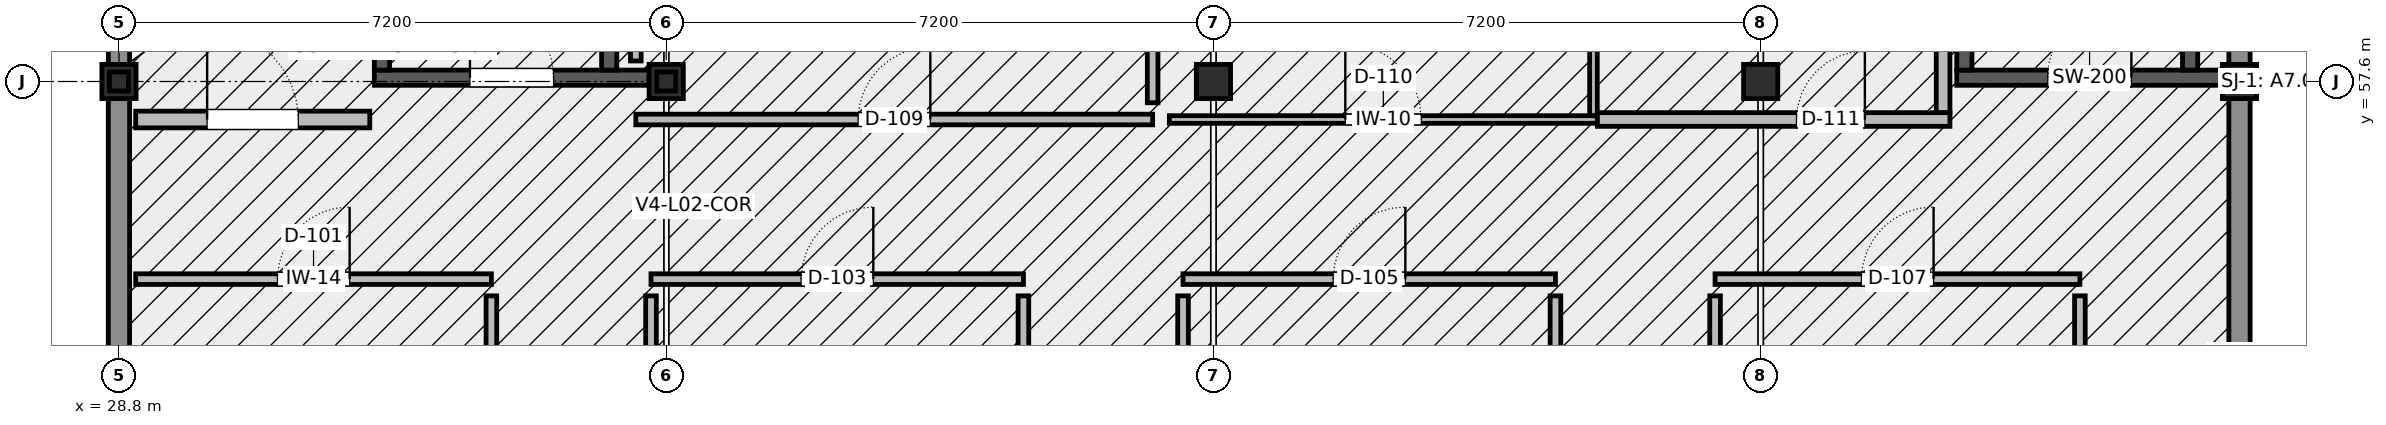
"""IFC4 building model, lengths in metres.
Left out: names, types, materials, properties, quantities, classifications, styles, units other than length and angle.
Written with IfcOpenShell. Run it as: python <this file> out.ifc"""

import sys

from ifc_helpers import new_model, si_unit, direction, frame, frame_2d, origin, origin_2d, place, context, subcontext, project, spatial, rectangle, hollow_rectangle, extrude, element, fill, save


model = new_model("IFC4")
c1 = context("Model", 3, precision=1e-05, world=origin(), true_north=direction((0.0, 1.0)))
c2 = subcontext(c1, "Body", "Model", "MODEL_VIEW")
j1 = project(units=[si_unit("LENGTHUNIT", "METRE"), si_unit("PLANEANGLEUNIT", "RADIAN")], contexts=[c1])
p1 = place(None, origin())
s1 = spatial("IfcSite", under=j1, at=p1, CompositionType="ELEMENT")
p2 = place(p1, origin())
s2 = spatial("IfcBuilding", under=s1, at=p2, CompositionType="ELEMENT")
p3 = place(p2, frame((0.0, 0.0, 9.6)))
s3 = spatial("IfcBuildingStorey", under=s2, at=p3, CompositionType="ELEMENT", Elevation=9.6)
for number, where, z_axis, x_axis in (
    (1, (28.8, 57.6, 0.0), (0.0, 0.0, 1.0), (1.0, 0.0, 0.0)),
    (2, (36.0, 57.6, 0.0), (0.0, 0.0, 1.0), (1.0, 0.0, 0.0)),
    (3, (43.2, 57.6, 0.0), (0.0, 0.0, 1.0), (1.0, 0.0, 0.0)),
    (4, (50.4, 57.6, 0.0), (0.0, 0.0, 1.0), (1.0, 0.0, 0.0)),
    (5, (56.7, 57.6, 0.0), (0.0, 0.0, 1.0), (1.0, 0.0, 0.0)),
):
    element("IfcColumn", number, at=place(p3, frame(where, z_axis=z_axis, x_axis=x_axis)), inside=s3, PredefinedType="COLUMN", context=c2, shape_type="SweptSolid", body=[
        extrude(rectangle(XDim=0.45, YDim=0.45, at=origin_2d()), origin(), (0.0, 0.0, 1.0), 3.9),
    ])
p4 = place(p3, frame((32.16, 57.65, 0.0), z_axis=(0.0, 0.0, 1.0), x_axis=(1.0, 0.0, 0.0)))
e6 = element("IfcWall", 6, at=p4, inside=s3, PredefinedType="SHEAR", context=c2, shape_type="SweptSolid", body=[
    extrude(rectangle(XDim=3.615, YDim=0.2, at=frame_2d((1.808, 0.0))), origin(), (0.0, 0.0, 1.0), 3.65),
])
p5 = place(p4, frame((1.258, 0.0, 0.0)))
e7 = element("IfcOpeningElement", 7, at=p5, cuts=e6, PredefinedType="OPENING", context=c2, shape_type="SweptSolid", body=[
    extrude(rectangle(XDim=1.1, YDim=2.15, at=frame_2d((0.55, 1.075))), frame((0.0, 0.112, 0.0), z_axis=(0.0, -1.0, 0.0), x_axis=(1.0, 0.0, 0.0)), (0.0, 0.0, 1.0), 0.224),
])
for number, where, z_axis, x_axis in (
    (8, (32.26, 57.75, 0.0), (0.0, 0.0, 1.0), (0.0, 1.0, 0.0)),
    (9, (35.25, 57.75, 0.0), (0.0, 0.0, 1.0), (0.0, 1.0, 0.0)),
):
    element("IfcWall", number, at=place(p3, frame(where, z_axis=z_axis, x_axis=x_axis)), inside=s3, PredefinedType="SHEAR", context=c2, shape_type="SweptSolid", body=[
        extrude(rectangle(XDim=6.56, YDim=0.2, at=frame_2d((3.28, 0.0))), origin(), (0.0, 0.0, 1.0), 3.65),
    ])
p6 = place(p3, frame((52.98, 57.65, 0.0), z_axis=(0.0, 0.0, 1.0), x_axis=(1.0, 0.0, 0.0)))
e10 = element("IfcWall", 10, at=p6, inside=s3, PredefinedType="SHEAR", context=c2, shape_type="SweptSolid", body=[
    extrude(rectangle(XDim=3.495, YDim=0.2, at=frame_2d((1.748, 0.0))), origin(), (0.0, 0.0, 1.0), 3.65),
])
p7 = place(p6, frame((1.198, 0.0, 0.0)))
e11 = element("IfcOpeningElement", 11, at=p7, cuts=e10, PredefinedType="OPENING", context=c2, shape_type="SweptSolid", body=[
    extrude(rectangle(XDim=1.1, YDim=2.15, at=frame_2d((0.55, 1.075))), frame((0.0, 0.112, 0.0), z_axis=(0.0, -1.0, 0.0), x_axis=(1.0, 0.0, 0.0)), (0.0, 0.0, 1.0), 0.224),
])
for number, where, z_axis, x_axis in (
    (12, (53.08, 57.75, 0.0), (0.0, 0.0, 1.0), (0.0, 1.0, 0.0)),
    (13, (56.05, 57.75, 0.0), (0.0, 0.0, 1.0), (0.0, 1.0, 0.0)),
):
    element("IfcWall", number, at=place(p3, frame(where, z_axis=z_axis, x_axis=x_axis)), inside=s3, PredefinedType="SHEAR", context=c2, shape_type="SweptSolid", body=[
        extrude(rectangle(XDim=6.54, YDim=0.2, at=frame_2d((3.27, 0.0))), origin(), (0.0, 0.0, 1.0), 3.65),
    ])
p8 = place(p3, frame((28.8, 57.6, 3.9), z_axis=(0.0, 0.0, 1.0), x_axis=(1.0, 0.0, 0.0)))
e14 = element("IfcColumn", 14, at=p8, inside=s3, PredefinedType="COLUMN", context=c2, shape_type="SweptSolid", body=[
    extrude(hollow_rectangle(XDim=0.25, YDim=0.25, WallThickness=0.012, InnerFilletRadius=0.012, OuterFilletRadius=0.024, at=origin_2d()), origin(), (0.0, 0.0, 1.0), 2.29),
])
p9 = place(p3, frame((36.0, 57.6, 3.9), z_axis=(0.0, 0.0, 1.0), x_axis=(1.0, 0.0, 0.0)))
e15 = element("IfcColumn", 15, at=p9, inside=s3, PredefinedType="COLUMN", context=c2, shape_type="SweptSolid", body=[
    extrude(hollow_rectangle(XDim=0.25, YDim=0.25, WallThickness=0.012, InnerFilletRadius=0.012, OuterFilletRadius=0.024, at=origin_2d()), origin(), (0.0, 0.0, 1.0), 4.18),
])
for number, where, z_axis, x_axis in (
    (16, (56.7, 50.625, 0.0), (0.0, 0.0, 1.0), (0.0, 1.0, 0.0)),
    (17, (56.7, 57.825, 0.0), (0.0, 0.0, 1.0), (0.0, 1.0, 0.0)),
    (18, (28.8, 64.575, 0.0), (0.0, 0.0, 1.0), (0.0, -1.0, 0.0)),
):
    element("IfcWall", number, at=place(p3, frame(where, z_axis=z_axis, x_axis=x_axis)), inside=s3, PredefinedType="ELEMENTEDWALL", context=c2, shape_type="SweptSolid", body=[
        extrude(rectangle(XDim=6.75, YDim=0.28, at=frame_2d((3.375, 0.0))), origin(), (0.0, 0.0, 1.0), 3.473),
    ])
p10 = place(p3, frame((28.8, 57.375, 0.0), z_axis=(0.0, 0.0, 1.0), x_axis=(0.0, -1.0, 0.0)))
e19 = element("IfcWall", 19, at=p10, inside=s3, PredefinedType="ELEMENTEDWALL", context=c2, shape_type="SweptSolid", body=[
    extrude(rectangle(XDim=6.75, YDim=0.28, at=frame_2d((3.375, 0.0))), origin(), (0.0, 0.0, 1.0), 3.473),
])
p11 = place(p10, frame((3.913, 0.0, 0.85)))
e20 = element("IfcOpeningElement", 20, at=p11, cuts=e19, PredefinedType="OPENING", context=c2, shape_type="SweptSolid", body=[
    extrude(rectangle(XDim=1.4, YDim=1.65, at=frame_2d((0.7, 0.825))), frame((0.0, 0.152, 0.0), z_axis=(0.0, -1.0, 0.0), x_axis=(1.0, 0.0, 0.0)), (0.0, 0.0, 1.0), 0.304),
])
p12 = place(p3, frame((28.8, 50.75, 3.95), z_axis=(0.0, 0.0, 1.0), x_axis=(0.0, 1.0, 0.0)))
e21 = element("IfcWall", 21, at=p12, inside=s3, PredefinedType="ELEMENTEDWALL", context=c2, shape_type="SweptSolid", body=[
    extrude(rectangle(XDim=13.7, YDim=0.28, at=frame_2d((6.85, 0.0))), origin(), (0.0, 0.0, 1.0), 2.23),
])
p13 = place(p3, frame((29.02, 57.1, 0.0), z_axis=(0.0, 0.0, 1.0), x_axis=(1.0, 0.0, 0.0)))
e22 = element("IfcWall", 22, at=p13, inside=s3, PredefinedType="STANDARD", context=c2, shape_type="SweptSolid", body=[
    extrude(rectangle(XDim=3.08, YDim=0.22, at=frame_2d((1.54, 0.0))), origin(), (0.0, 0.0, 1.0), 3.62),
])
p14 = place(p13, frame((0.94, 0.0, 0.0)))
e23 = element("IfcOpeningElement", 23, at=p14, cuts=e22, PredefinedType="OPENING", context=c2, shape_type="SweptSolid", body=[
    extrude(rectangle(XDim=1.2, YDim=2.2, at=frame_2d((0.6, 1.1))), frame((0.0, 0.122, 0.0), z_axis=(0.0, -1.0, 0.0), x_axis=(1.0, 0.0, 0.0)), (0.0, 0.0, 1.0), 0.244),
])
p15 = place(p3, frame((29.02, 55.0, 0.0), z_axis=(0.0, 0.0, 1.0), x_axis=(1.0, 0.0, 0.0)))
e24 = element("IfcWall", 24, at=p15, inside=s3, PredefinedType="PARTITIONING", context=c2, shape_type="SweptSolid", body=[
    extrude(rectangle(XDim=4.68, YDim=0.14, at=frame_2d((2.34, 0.0))), origin(), (0.0, 0.0, 1.0), 3.62),
])
p16 = place(p15, frame((1.865, 0.0, 0.0)))
e25 = element("IfcOpeningElement", 25, at=p16, cuts=e24, PredefinedType="OPENING", context=c2, shape_type="SweptSolid", body=[
    extrude(rectangle(XDim=0.95, YDim=2.1, at=frame_2d((0.475, 1.05))), frame((0.0, 0.082, 0.0), z_axis=(0.0, -1.0, 0.0), x_axis=(1.0, 0.0, 0.0)), (0.0, 0.0, 1.0), 0.164),
])
p17 = place(p3, frame((33.7, 50.62, 0.0), z_axis=(0.0, 0.0, 1.0), x_axis=(0.0, 1.0, 0.0)))
e26 = element("IfcWall", 26, at=p17, inside=s3, PredefinedType="PARTITIONING", context=c2, shape_type="SweptSolid", body=[
    extrude(rectangle(XDim=4.16, YDim=0.14, at=frame_2d((2.08, 0.0))), origin(), (0.0, 0.0, 1.0), 3.62),
])
p18 = place(p17, frame((1.64, 0.0, 0.0)))
e27 = element("IfcOpeningElement", 27, at=p18, cuts=e26, PredefinedType="OPENING", context=c2, shape_type="SweptSolid", body=[
    extrude(rectangle(XDim=0.88, YDim=2.08, at=frame_2d((0.44, 1.04))), frame((0.0, 0.082, 0.0), z_axis=(0.0, -1.0, 0.0), x_axis=(1.0, 0.0, 0.0)), (0.0, 0.0, 1.0), 0.164),
])
p19 = place(p3, frame((35.8, 55.0, 0.0), z_axis=(0.0, 0.0, 1.0), x_axis=(1.0, 0.0, 0.0)))
e28 = element("IfcWall", 28, at=p19, inside=s3, PredefinedType="PARTITIONING", context=c2, shape_type="SweptSolid", body=[
    extrude(rectangle(XDim=4.9, YDim=0.14, at=frame_2d((2.45, 0.0))), origin(), (0.0, 0.0, 1.0), 3.471),
])
p20 = place(p19, frame((1.975, 0.0, 0.0)))
e29 = element("IfcOpeningElement", 29, at=p20, cuts=e28, PredefinedType="OPENING", context=c2, shape_type="SweptSolid", body=[
    extrude(rectangle(XDim=0.95, YDim=2.1, at=frame_2d((0.475, 1.05))), frame((0.0, 0.082, 0.0), z_axis=(0.0, -1.0, 0.0), x_axis=(1.0, 0.0, 0.0)), (0.0, 0.0, 1.0), 0.164),
])
p21 = place(p3, frame((40.7, 50.62, 0.0), z_axis=(0.0, 0.0, 1.0), x_axis=(0.0, 1.0, 0.0)))
e30 = element("IfcWall", 30, at=p21, inside=s3, PredefinedType="PARTITIONING", context=c2, shape_type="SweptSolid", body=[
    extrude(rectangle(XDim=4.16, YDim=0.14, at=frame_2d((2.08, 0.0))), origin(), (0.0, 0.0, 1.0), 3.62),
])
p22 = place(p21, frame((1.64, 0.0, 0.0)))
e31 = element("IfcOpeningElement", 31, at=p22, cuts=e30, PredefinedType="OPENING", context=c2, shape_type="SweptSolid", body=[
    extrude(rectangle(XDim=0.88, YDim=2.08, at=frame_2d((0.44, 1.04))), frame((0.0, 0.082, 0.0), z_axis=(0.0, -1.0, 0.0), x_axis=(1.0, 0.0, 0.0)), (0.0, 0.0, 1.0), 0.164),
])
p23 = place(p3, frame((35.8, 53.82, 0.0), z_axis=(0.0, 0.0, 1.0), x_axis=(0.0, 1.0, 0.0)))
e32 = element("IfcWall", 32, at=p23, inside=s3, PredefinedType="PARTITIONING", context=c2, shape_type="SweptSolid", body=[
    extrude(rectangle(XDim=0.96, YDim=0.14, at=frame_2d((0.48, 0.0))), origin(), (0.0, 0.0, 1.0), 3.471),
])
p24 = place(p3, frame((42.8, 55.0, 0.0), z_axis=(0.0, 0.0, 1.0), x_axis=(1.0, 0.0, 0.0)))
e33 = element("IfcWall", 33, at=p24, inside=s3, PredefinedType="PARTITIONING", context=c2, shape_type="SweptSolid", body=[
    extrude(rectangle(XDim=4.9, YDim=0.14, at=frame_2d((2.45, 0.0))), origin(), (0.0, 0.0, 1.0), 3.471),
])
p25 = place(p24, frame((1.975, 0.0, 0.0)))
e34 = element("IfcOpeningElement", 34, at=p25, cuts=e33, PredefinedType="OPENING", context=c2, shape_type="SweptSolid", body=[
    extrude(rectangle(XDim=0.95, YDim=2.1, at=frame_2d((0.475, 1.05))), frame((0.0, 0.082, 0.0), z_axis=(0.0, -1.0, 0.0), x_axis=(1.0, 0.0, 0.0)), (0.0, 0.0, 1.0), 0.164),
])
p26 = place(p3, frame((47.7, 50.62, 0.0), z_axis=(0.0, 0.0, 1.0), x_axis=(0.0, 1.0, 0.0)))
e35 = element("IfcWall", 35, at=p26, inside=s3, PredefinedType="PARTITIONING", context=c2, shape_type="SweptSolid", body=[
    extrude(rectangle(XDim=4.16, YDim=0.14, at=frame_2d((2.08, 0.0))), origin(), (0.0, 0.0, 1.0), 3.62),
])
p27 = place(p26, frame((1.64, 0.0, 0.0)))
e36 = element("IfcOpeningElement", 36, at=p27, cuts=e35, PredefinedType="OPENING", context=c2, shape_type="SweptSolid", body=[
    extrude(rectangle(XDim=0.88, YDim=2.08, at=frame_2d((0.44, 1.04))), frame((0.0, 0.082, 0.0), z_axis=(0.0, -1.0, 0.0), x_axis=(1.0, 0.0, 0.0)), (0.0, 0.0, 1.0), 0.164),
])
p28 = place(p3, frame((42.8, 53.82, 0.0), z_axis=(0.0, 0.0, 1.0), x_axis=(0.0, 1.0, 0.0)))
e37 = element("IfcWall", 37, at=p28, inside=s3, PredefinedType="PARTITIONING", context=c2, shape_type="SweptSolid", body=[
    extrude(rectangle(XDim=0.96, YDim=0.14, at=frame_2d((0.48, 0.0))), origin(), (0.0, 0.0, 1.0), 3.62),
])
p29 = place(p3, frame((49.8, 55.0, 0.0), z_axis=(0.0, 0.0, 1.0), x_axis=(1.0, 0.0, 0.0)))
e38 = element("IfcWall", 38, at=p29, inside=s3, PredefinedType="PARTITIONING", context=c2, shape_type="SweptSolid", body=[
    extrude(rectangle(XDim=4.8, YDim=0.14, at=frame_2d((2.4, 0.0))), origin(), (0.0, 0.0, 1.0), 3.471),
])
p30 = place(p29, frame((1.925, 0.0, 0.0)))
e39 = element("IfcOpeningElement", 39, at=p30, cuts=e38, PredefinedType="OPENING", context=c2, shape_type="SweptSolid", body=[
    extrude(rectangle(XDim=0.95, YDim=2.1, at=frame_2d((0.475, 1.05))), frame((0.0, 0.082, 0.0), z_axis=(0.0, -1.0, 0.0), x_axis=(1.0, 0.0, 0.0)), (0.0, 0.0, 1.0), 0.164),
])
p31 = place(p3, frame((54.6, 50.62, 0.0), z_axis=(0.0, 0.0, 1.0), x_axis=(0.0, 1.0, 0.0)))
e40 = element("IfcWall", 40, at=p31, inside=s3, PredefinedType="PARTITIONING", context=c2, shape_type="SweptSolid", body=[
    extrude(rectangle(XDim=4.16, YDim=0.14, at=frame_2d((2.08, 0.0))), origin(), (0.0, 0.0, 1.0), 3.62),
])
p32 = place(p31, frame((1.64, 0.0, 0.0)))
e41 = element("IfcOpeningElement", 41, at=p32, cuts=e40, PredefinedType="OPENING", context=c2, shape_type="SweptSolid", body=[
    extrude(rectangle(XDim=0.88, YDim=2.08, at=frame_2d((0.44, 1.04))), frame((0.0, 0.082, 0.0), z_axis=(0.0, -1.0, 0.0), x_axis=(1.0, 0.0, 0.0)), (0.0, 0.0, 1.0), 0.164),
])
p33 = place(p3, frame((49.8, 53.82, 0.0), z_axis=(0.0, 0.0, 1.0), x_axis=(0.0, 1.0, 0.0)))
e42 = element("IfcWall", 42, at=p33, inside=s3, PredefinedType="PARTITIONING", context=c2, shape_type="SweptSolid", body=[
    extrude(rectangle(XDim=0.96, YDim=0.14, at=frame_2d((0.48, 0.0))), origin(), (0.0, 0.0, 1.0), 3.62),
])
p34 = place(p3, frame((35.6, 57.1, 0.0), z_axis=(0.0, 0.0, 1.0), x_axis=(1.0, 0.0, 0.0)))
e43 = element("IfcWall", 43, at=p34, inside=s3, PredefinedType="PARTITIONING", context=c2, shape_type="SweptSolid", body=[
    extrude(rectangle(XDim=6.8, YDim=0.14, at=frame_2d((3.4, 0.0))), origin(), (0.0, 0.0, 1.0), 3.471),
])
p35 = place(p34, frame((2.925, 0.0, 0.0)))
e44 = element("IfcOpeningElement", 44, at=p35, cuts=e43, PredefinedType="OPENING", context=c2, shape_type="SweptSolid", body=[
    extrude(rectangle(XDim=0.95, YDim=2.1, at=frame_2d((0.475, 1.05))), frame((0.0, 0.082, 0.0), z_axis=(0.0, -1.0, 0.0), x_axis=(1.0, 0.0, 0.0)), (0.0, 0.0, 1.0), 0.164),
])
p36 = place(p3, frame((42.4, 57.32, 0.0), z_axis=(0.0, 0.0, 1.0), x_axis=(0.0, 1.0, 0.0)))
e45 = element("IfcWall", 45, at=p36, inside=s3, PredefinedType="PARTITIONING", context=c2, shape_type="SweptSolid", body=[
    extrude(rectangle(XDim=7.26, YDim=0.14, at=frame_2d((3.63, 0.0))), origin(), (0.0, 0.0, 1.0), 3.473),
])
p37 = place(p3, frame((35.6, 57.87, 0.0), z_axis=(0.0, 0.0, 1.0), x_axis=(0.0, 1.0, 0.0)))
e46 = element("IfcWall", 46, at=p37, inside=s3, PredefinedType="PARTITIONING", context=c2, shape_type="SweptSolid", body=[
    extrude(rectangle(XDim=6.71, YDim=0.14, at=frame_2d((3.355, 0.0))), origin(), (0.0, 0.0, 1.0), 3.62),
])
p38 = place(p3, frame((42.62, 57.1, 0.0), z_axis=(0.0, 0.0, 1.0), x_axis=(1.0, 0.0, 0.0)))
e47 = element("IfcWall", 47, at=p38, inside=s3, PredefinedType="PARTITIONING", context=c2, shape_type="SweptSolid", body=[
    extrude(rectangle(XDim=5.63, YDim=0.1, at=frame_2d((2.815, 0.0))), origin(), (0.0, 0.0, 1.0), 3.471),
])
p39 = place(p38, frame((2.315, 0.0, 0.0)))
e48 = element("IfcOpeningElement", 48, at=p39, cuts=e47, PredefinedType="OPENING", context=c2, shape_type="SweptSolid", body=[
    extrude(rectangle(XDim=1.0, YDim=2.15, at=frame_2d((0.5, 1.075))), frame((0.0, 0.062, 0.0), z_axis=(0.0, -1.0, 0.0), x_axis=(1.0, 0.0, 0.0)), (0.0, 0.0, 1.0), 0.124),
])
p40 = place(p3, frame((48.2, 57.152, 0.0), z_axis=(0.0, 0.0, 1.0), x_axis=(0.0, 1.0, 0.0)))
e49 = element("IfcWall", 49, at=p40, inside=s3, PredefinedType="PARTITIONING", context=c2, shape_type="SweptSolid", body=[
    extrude(rectangle(XDim=7.506, YDim=0.1, at=frame_2d((3.753, 0.0))), origin(), (0.0, 0.0, 1.0), 3.473),
])
p41 = place(p3, frame((48.252, 57.1, 0.0), z_axis=(0.0, 0.0, 1.0), x_axis=(1.0, 0.0, 0.0)))
e50 = element("IfcWall", 50, at=p41, inside=s3, PredefinedType="PLUMBINGWALL", context=c2, shape_type="SweptSolid", body=[
    extrude(rectangle(XDim=4.638, YDim=0.18, at=frame_2d((2.319, 0.0))), origin(), (0.0, 0.0, 1.0), 3.471),
])
p42 = place(p41, frame((2.619, 0.0, 0.0)))
e51 = element("IfcOpeningElement", 51, at=p42, cuts=e50, PredefinedType="OPENING", context=c2, shape_type="SweptSolid", body=[
    extrude(rectangle(XDim=0.9, YDim=2.1, at=frame_2d((0.45, 1.05))), frame((0.0, 0.102, 0.0), z_axis=(0.0, -1.0, 0.0), x_axis=(1.0, 0.0, 0.0)), (0.0, 0.0, 1.0), 0.204),
])
p43 = place(p3, frame((52.8, 57.192, 0.0), z_axis=(0.0, 0.0, 1.0), x_axis=(0.0, 1.0, 0.0)))
e52 = element("IfcWall", 52, at=p43, inside=s3, PredefinedType="PLUMBINGWALL", context=c2, shape_type="SweptSolid", body=[
    extrude(rectangle(XDim=7.466, YDim=0.18, at=frame_2d((3.733, 0.0))), origin(), (0.0, 0.0, 1.0), 3.473),
])
p44 = place(p5, origin())
e53 = element("IfcDoor", 53, at=p44, inside=s3, OperationType="SINGLE_SWING_LEFT", PredefinedType="DOOR", context=c2, shape_type="SweptSolid", body=[
    extrude(rectangle(XDim=1.1, YDim=2.15, at=frame_2d((0.55, 1.075))), frame((0.0, 0.025, 0.0), z_axis=(0.0, -1.0, 0.0), x_axis=(1.0, 0.0, 0.0)), (0.0, 0.0, 1.0), 0.05),
])
fill(e7, e53)
p45 = place(p7, origin())
e54 = element("IfcDoor", 54, at=p45, inside=s3, OperationType="SINGLE_SWING_RIGHT", PredefinedType="DOOR", context=c2, shape_type="SweptSolid", body=[
    extrude(rectangle(XDim=1.1, YDim=2.15, at=frame_2d((0.55, 1.075))), frame((0.0, 0.025, 0.0), z_axis=(0.0, -1.0, 0.0), x_axis=(1.0, 0.0, 0.0)), (0.0, 0.0, 1.0), 0.05),
])
fill(e11, e54)
p46 = place(p14, origin())
e55 = element("IfcDoor", 55, at=p46, inside=s3, OperationType="SINGLE_SWING_LEFT", PredefinedType="DOOR", context=c2, shape_type="SweptSolid", body=[
    extrude(rectangle(XDim=1.2, YDim=2.2, at=frame_2d((0.6, 1.1))), frame((0.0, 0.025, 0.0), z_axis=(0.0, -1.0, 0.0), x_axis=(1.0, 0.0, 0.0)), (0.0, 0.0, 1.0), 0.05),
])
fill(e23, e55)
p47 = place(p16, origin())
e56 = element("IfcDoor", 56, at=p47, inside=s3, OperationType="SINGLE_SWING_RIGHT", PredefinedType="DOOR", context=c2, shape_type="SweptSolid", body=[
    extrude(rectangle(XDim=0.95, YDim=2.1, at=frame_2d((0.475, 1.05))), frame((0.0, 0.025, 0.0), z_axis=(0.0, -1.0, 0.0), x_axis=(1.0, 0.0, 0.0)), (0.0, 0.0, 1.0), 0.05),
])
fill(e25, e56)
p48 = place(p20, origin())
e57 = element("IfcDoor", 57, at=p48, inside=s3, OperationType="SINGLE_SWING_RIGHT", PredefinedType="DOOR", context=c2, shape_type="SweptSolid", body=[
    extrude(rectangle(XDim=0.95, YDim=2.1, at=frame_2d((0.475, 1.05))), frame((0.0, 0.025, 0.0), z_axis=(0.0, -1.0, 0.0), x_axis=(1.0, 0.0, 0.0)), (0.0, 0.0, 1.0), 0.05),
])
fill(e29, e57)
p49 = place(p25, origin())
e58 = element("IfcDoor", 58, at=p49, inside=s3, OperationType="SINGLE_SWING_RIGHT", PredefinedType="DOOR", context=c2, shape_type="SweptSolid", body=[
    extrude(rectangle(XDim=0.95, YDim=2.1, at=frame_2d((0.475, 1.05))), frame((0.0, 0.025, 0.0), z_axis=(0.0, -1.0, 0.0), x_axis=(1.0, 0.0, 0.0)), (0.0, 0.0, 1.0), 0.05),
])
fill(e34, e58)
p50 = place(p30, origin())
e59 = element("IfcDoor", 59, at=p50, inside=s3, OperationType="SINGLE_SWING_RIGHT", PredefinedType="DOOR", context=c2, shape_type="SweptSolid", body=[
    extrude(rectangle(XDim=0.95, YDim=2.1, at=frame_2d((0.475, 1.05))), frame((0.0, 0.025, 0.0), z_axis=(0.0, -1.0, 0.0), x_axis=(1.0, 0.0, 0.0)), (0.0, 0.0, 1.0), 0.05),
])
fill(e39, e59)
p51 = place(p35, origin())
e60 = element("IfcDoor", 60, at=p51, inside=s3, OperationType="SINGLE_SWING_RIGHT", PredefinedType="DOOR", context=c2, shape_type="SweptSolid", body=[
    extrude(rectangle(XDim=0.95, YDim=2.1, at=frame_2d((0.475, 1.05))), frame((0.0, 0.025, 0.0), z_axis=(0.0, -1.0, 0.0), x_axis=(1.0, 0.0, 0.0)), (0.0, 0.0, 1.0), 0.05),
])
fill(e44, e60)
p52 = place(p39, origin())
e61 = element("IfcDoor", 61, at=p52, inside=s3, OperationType="SINGLE_SWING_LEFT", PredefinedType="DOOR", context=c2, shape_type="SweptSolid", body=[
    extrude(rectangle(XDim=1.0, YDim=2.15, at=frame_2d((0.5, 1.075))), frame((0.0, 0.025, 0.0), z_axis=(0.0, -1.0, 0.0), x_axis=(1.0, 0.0, 0.0)), (0.0, 0.0, 1.0), 0.05),
])
fill(e48, e61)
p53 = place(p42, origin())
e62 = element("IfcDoor", 62, at=p53, inside=s3, OperationType="SINGLE_SWING_RIGHT", PredefinedType="DOOR", context=c2, shape_type="SweptSolid", body=[
    extrude(rectangle(XDim=0.9, YDim=2.1, at=frame_2d((0.45, 1.05))), frame((0.0, 0.025, 0.0), z_axis=(0.0, -1.0, 0.0), x_axis=(1.0, 0.0, 0.0)), (0.0, 0.0, 1.0), 0.05),
])
fill(e51, e62)
save(model, sys.argv[1])
